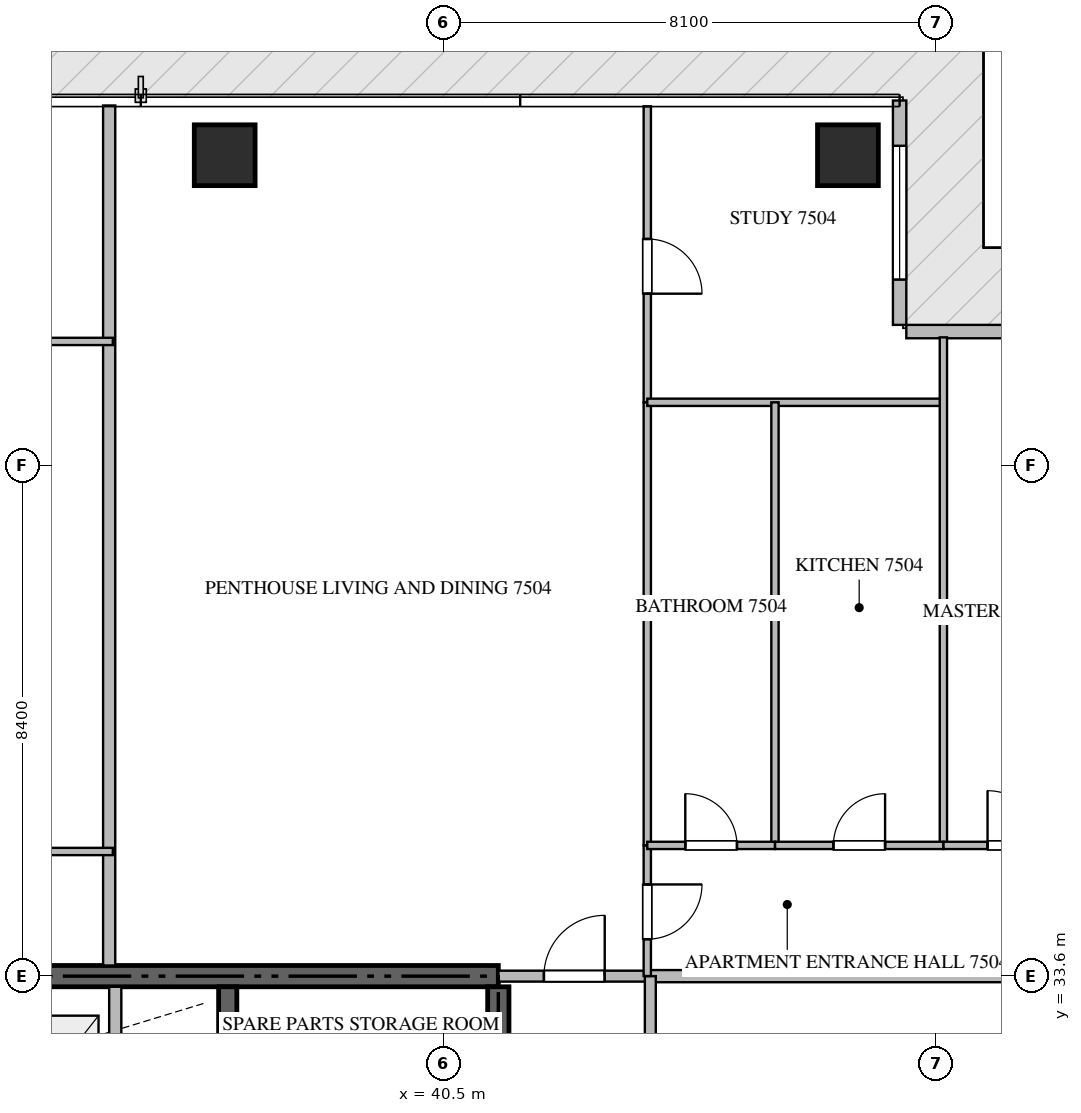
"""IFC4 building model, lengths in metres.
Left out: names, types, materials, properties, quantities, classifications, styles, units other than length and angle.
Written with IfcOpenShell. Run it as: python <this file> out.ifc"""

import sys

from ifc_helpers import new_model, si_unit, direction, frame, frame_2d, origin, origin_2d, place, context, subcontext, project, spatial, rectangle, extrude, source, transform, mapped, element, fill, save


model = new_model("IFC4")
c1 = context("Model", 3, precision=1e-05, world=origin(), true_north=direction((0.0, 1.0)))
c2 = subcontext(c1, "Body", "Model", "MODEL_VIEW")
j1 = project(units=[si_unit("LENGTHUNIT", "METRE"), si_unit("PLANEANGLEUNIT", "RADIAN")], contexts=[c1])
p1 = place(None, origin())
s1 = spatial("IfcSite", under=j1, at=p1, CompositionType="ELEMENT")
p2 = place(p1, origin())
s2 = spatial("IfcBuilding", under=s1, at=p2, CompositionType="ELEMENT")
p3 = place(p2, frame((0.0, 0.0, 301.55)))
s3 = spatial("IfcBuildingStorey", under=s2, at=p3, CompositionType="ELEMENT", Elevation=301.55)
p4 = place(p3, frame((41.4, 33.6, -0.26), z_axis=(0.0, 0.0, 1.0), x_axis=(-1.0, 0.0, 0.0)))
e1 = element("IfcWall", 1, at=p4, inside=s3, PredefinedType="SHEAR", context=c2, shape_type="SweptSolid", body=[
    extrude(rectangle(XDim=18.0, YDim=0.35, at=frame_2d((9.0, 0.0))), origin(), (0.0, 0.0, 1.0), 4.048),
])
p5 = place(p3, frame((41.4, 27.75, -0.26), z_axis=(0.0, 0.0, 1.0), x_axis=(0.0, 1.0, 0.0)))
e2 = element("IfcWall", 2, at=p5, inside=s3, PredefinedType="SHEAR", context=c2, shape_type="SweptSolid", body=[
    extrude(rectangle(XDim=5.675, YDim=0.35, at=frame_2d((2.837, 0.0))), origin(), (0.0, 0.0, 1.0), 4.048),
])
p6 = place(p3, frame((36.95, 27.05, -0.26), z_axis=(0.0, 0.0, 1.0), x_axis=(0.0, 1.0, 0.0)))
e3 = element("IfcWall", 3, at=p6, inside=s3, PredefinedType="SHEAR", context=c2, shape_type="SweptSolid", body=[
    extrude(rectangle(XDim=6.375, YDim=0.3, at=frame_2d((3.188, 0.0))), origin(), (0.0, 0.0, 1.0), 4.048),
])
m1 = source(origin(), c2, "Body", "SweptSolid", [
    extrude(rectangle(XDim=1.0, YDim=1.0, at=origin_2d()), origin(), (0.0, 0.0, 1.0), 4.05),
])
for number, where, z_axis, x_axis in (
    (4, (36.9, 47.1, -0.26), (0.0, 0.0, 1.0), (1.0, 0.0, 0.0)),
    (5, (47.15, 47.1, -0.26), (0.0, 0.0, 1.0), (1.0, 0.0, 0.0)),
):
    element("IfcColumn", number, at=place(p3, frame(where, z_axis=z_axis, x_axis=x_axis)), inside=s3, PredefinedType="COLUMN", context=c2, shape_type="MappedRepresentation", body=[
        mapped(m1, transform((0.0, 0.0, 0.0), scale=1.0)),
    ])
p7 = place(p3, frame((51.69, 44.2, 0.0), z_axis=(0.0, 0.0, 1.0), x_axis=(-1.0, 0.0, 0.0)))
e6 = element("IfcWall", 6, at=p7, inside=s3, PredefinedType="ELEMENTEDWALL", context=c2, shape_type="SweptSolid", body=[
    extrude(rectangle(XDim=3.58, YDim=0.22, at=frame_2d((1.79, 0.0))), origin(), (0.0, 0.0, 1.0), 3.775),
])
p8 = place(p3, frame((48.0, 44.31, 0.0), z_axis=(0.0, 0.0, 1.0), x_axis=(0.0, 1.0, 0.0)))
e7 = element("IfcWall", 7, at=p8, inside=s3, PredefinedType="ELEMENTEDWALL", context=c2, shape_type="SweptSolid", body=[
    extrude(rectangle(XDim=3.69, YDim=0.22, at=frame_2d((1.845, 0.0))), origin(), (0.0, 0.0, 1.0), 3.775),
])
p9 = place(p8, frame((0.745, 0.0, 0.65)))
e8 = element("IfcOpeningElement", 8, at=p9, cuts=e7, PredefinedType="OPENING", context=c2, shape_type="SweptSolid", body=[
    extrude(rectangle(XDim=2.2, YDim=2.4, at=frame_2d((1.1, 1.2))), frame((0.0, 0.12, 0.0), z_axis=(0.0, -1.0, 0.0), x_axis=(1.0, 0.0, 0.0)), (0.0, 0.0, 1.0), 0.24),
])
p10 = place(p3, frame((35.1, 30.75, 0.0), z_axis=(0.0, 0.0, 1.0), x_axis=(0.0, 1.0, 0.0)))
e9 = element("IfcWall", 9, at=p10, inside=s3, PredefinedType="STANDARD", context=c2, shape_type="SweptSolid", body=[
    extrude(rectangle(XDim=2.675, YDim=0.2, at=frame_2d((1.337, 0.0))), origin(), (0.0, 0.0, 1.0), 3.79),
])
p11 = place(p3, frame((35.0, 33.775, 0.0), z_axis=(0.0, 0.0, 1.0), x_axis=(0.0, 1.0, 0.0)))
e10 = element("IfcWall", 10, at=p11, inside=s3, PredefinedType="PARTITIONING", context=c2, shape_type="SweptSolid", body=[
    extrude(rectangle(XDim=14.143, YDim=0.2, at=frame_2d((7.072, 0.0))), origin(), (0.0, 0.0, 1.0), 3.79),
])
p12 = place(p3, frame((43.9, 33.6, 0.0), z_axis=(0.0, 0.0, 1.0), x_axis=(1.0, 0.0, 0.0)))
e11 = element("IfcWall", 11, at=p12, inside=s3, PredefinedType="PARTITIONING", context=c2, shape_type="SweptSolid", body=[
    extrude(rectangle(XDim=11.618, YDim=0.2, at=frame_2d((5.809, 0.0))), origin(), (0.0, 0.0, 1.0), 3.79),
])
p13 = place(p3, frame((41.402, 33.6, 0.0), z_axis=(0.0, 0.0, 1.0), x_axis=(1.0, 0.0, 0.0)))
e12 = element("IfcWall", 12, at=p13, inside=s3, PredefinedType="PARTITIONING", context=c2, shape_type="SweptSolid", body=[
    extrude(rectangle(XDim=2.496, YDim=0.18, at=frame_2d((1.248, 0.0))), origin(), (0.0, 0.0, 1.0), 3.79),
])
p14 = place(p13, frame((0.748, 0.0, 0.0)))
e13 = element("IfcOpeningElement", 13, at=p14, cuts=e12, PredefinedType="OPENING", context=c2, shape_type="SweptSolid", body=[
    extrude(rectangle(XDim=1.0, YDim=2.15, at=frame_2d((0.5, 1.075))), frame((0.0, 0.1, 0.0), z_axis=(0.0, -1.0, 0.0), x_axis=(1.0, 0.0, 0.0)), (0.0, 0.0, 1.0), 0.2),
])
p15 = place(p3, frame((43.9, 16.8, 0.0), z_axis=(0.0, 0.0, 1.0), x_axis=(0.0, 1.0, 0.0)))
e14 = element("IfcWall", 14, at=p15, inside=s3, PredefinedType="PARTITIONING", context=c2, shape_type="SweptSolid", body=[
    extrude(rectangle(XDim=16.8, YDim=0.18, at=frame_2d((8.4, 0.0))), origin(), (0.0, 0.0, 1.0), 3.79),
])
p16 = place(p15, frame((1.3, 0.0, 0.0)))
e15 = element("IfcOpeningElement", 15, at=p16, cuts=e14, PredefinedType="OPENING", context=c2, shape_type="SweptSolid", body=[
    extrude(rectangle(XDim=1.0, YDim=2.15, at=frame_2d((0.5, 1.075))), frame((0.0, 0.1, 0.0), z_axis=(0.0, -1.0, 0.0), x_axis=(1.0, 0.0, 0.0)), (0.0, 0.0, 1.0), 0.2),
])
for number, where, z_axis, x_axis in (
    (16, (26.3, 44.038, 0.0), (0.0, 0.0, 1.0), (1.0, 0.0, 0.0)),
    (17, (26.3, 35.65, 0.0), (0.0, 0.0, 1.0), (1.0, 0.0, 0.0)),
):
    element("IfcWall", number, at=place(p3, frame(where, z_axis=z_axis, x_axis=x_axis)), inside=s3, PredefinedType="PARTITIONING", context=c2, shape_type="SweptSolid", body=[
        extrude(rectangle(XDim=8.76, YDim=0.12, at=frame_2d((4.38, 0.0))), origin(), (0.0, 0.0, 1.0), 3.79),
    ])
p17 = place(p3, frame((43.85, 35.75, 0.0), z_axis=(0.0, 0.0, 1.0), x_axis=(0.0, -1.0, 0.0)))
e18 = element("IfcWall", 18, at=p17, inside=s3, PredefinedType="PARTITIONING", context=c2, shape_type="SweptSolid", body=[
    extrude(rectangle(XDim=2.148, YDim=0.12, at=frame_2d((1.074, 0.0))), origin(), (0.0, 0.0, 1.0), 3.79),
])
p18 = place(p17, frame((0.642, 0.0, 0.0)))
e19 = element("IfcOpeningElement", 19, at=p18, cuts=e18, PredefinedType="OPENING", context=c2, shape_type="SweptSolid", body=[
    extrude(rectangle(XDim=0.9, YDim=2.1, at=frame_2d((0.45, 1.05))), frame((0.0, 0.07, 0.0), z_axis=(0.0, -1.0, 0.0), x_axis=(1.0, 0.0, 0.0)), (0.0, 0.0, 1.0), 0.14),
])
p19 = place(p3, frame((43.85, 47.905, 0.0), z_axis=(0.0, 0.0, 1.0), x_axis=(0.0, -1.0, 0.0)))
e20 = element("IfcWall", 20, at=p19, inside=s3, PredefinedType="PARTITIONING", context=c2, shape_type="SweptSolid", body=[
    extrude(rectangle(XDim=4.868, YDim=0.12, at=frame_2d((2.434, 0.0))), origin(), (0.0, 0.0, 1.0), 3.79),
])
p20 = place(p19, frame((2.182, 0.0, 0.0)))
e21 = element("IfcOpeningElement", 21, at=p20, cuts=e20, PredefinedType="OPENING", context=c2, shape_type="SweptSolid", body=[
    extrude(rectangle(XDim=0.9, YDim=2.1, at=frame_2d((0.45, 1.05))), frame((0.0, 0.07, 0.0), z_axis=(0.0, -1.0, 0.0), x_axis=(1.0, 0.0, 0.0)), (0.0, 0.0, 1.0), 0.14),
])
p21 = place(p3, frame((43.85, 43.035, 0.0), z_axis=(0.0, 0.0, 1.0), x_axis=(0.0, -1.0, 0.0)))
e22 = element("IfcWall", 22, at=p21, inside=s3, PredefinedType="PARTITIONING", context=c2, shape_type="SweptSolid", body=[
    extrude(rectangle(XDim=7.283, YDim=0.12, at=frame_2d((3.642, 0.0))), origin(), (0.0, 0.0, 1.0), 3.79),
])
p22 = place(p3, frame((43.85, 43.037, 0.0), z_axis=(0.0, 0.0, 1.0), x_axis=(1.0, 0.0, 0.0)))
e23 = element("IfcWall", 23, at=p22, inside=s3, PredefinedType="PARTITIONING", context=c2, shape_type="SweptSolid", body=[
    extrude(rectangle(XDim=4.87, YDim=0.12, at=frame_2d((2.435, 0.0))), origin(), (0.0, 0.0, 1.0), 3.79),
])
p23 = place(p3, frame((48.72, 44.105, 0.0), z_axis=(0.0, 0.0, 1.0), x_axis=(0.0, -1.0, 0.0)))
e24 = element("IfcWall", 24, at=p23, inside=s3, PredefinedType="PARTITIONING", context=c2, shape_type="SweptSolid", body=[
    extrude(rectangle(XDim=8.355, YDim=0.12, at=frame_2d((4.177, 0.0))), origin(), (0.0, 0.0, 1.0), 3.79),
])
p24 = place(p3, frame((45.95, 43.037, 0.0), z_axis=(0.0, 0.0, 1.0), x_axis=(0.0, -1.0, 0.0)))
e25 = element("IfcWall", 25, at=p24, inside=s3, PredefinedType="PARTITIONING", context=c2, shape_type="SweptSolid", body=[
    extrude(rectangle(XDim=7.287, YDim=0.12, at=frame_2d((3.644, 0.0))), origin(), (0.0, 0.0, 1.0), 3.79),
])
p25 = place(p3, frame((43.85, 35.75, 0.0), z_axis=(0.0, 0.0, 1.0), x_axis=(1.0, 0.0, 0.0)))
e26 = element("IfcWall", 26, at=p25, inside=s3, PredefinedType="PARTITIONING", context=c2, shape_type="SweptSolid", body=[
    extrude(rectangle(XDim=2.1, YDim=0.12, at=frame_2d((1.05, 0.0))), origin(), (0.0, 0.0, 1.0), 3.79),
])
p26 = place(p25, frame((0.625, 0.0, 0.0)))
e27 = element("IfcOpeningElement", 27, at=p26, cuts=e26, PredefinedType="OPENING", context=c2, shape_type="SweptSolid", body=[
    extrude(rectangle(XDim=0.85, YDim=2.1, at=frame_2d((0.425, 1.05))), frame((0.0, 0.07, 0.0), z_axis=(0.0, -1.0, 0.0), x_axis=(1.0, 0.0, 0.0)), (0.0, 0.0, 1.0), 0.14),
])
p27 = place(p3, frame((45.952, 35.75, 0.0), z_axis=(0.0, 0.0, 1.0), x_axis=(1.0, 0.0, 0.0)))
e28 = element("IfcWall", 28, at=p27, inside=s3, PredefinedType="PARTITIONING", context=c2, shape_type="SweptSolid", body=[
    extrude(rectangle(XDim=2.768, YDim=0.12, at=frame_2d((1.384, 0.0))), origin(), (0.0, 0.0, 1.0), 3.79),
])
p28 = place(p27, frame((0.959, 0.0, 0.0)))
e29 = element("IfcOpeningElement", 29, at=p28, cuts=e28, PredefinedType="OPENING", context=c2, shape_type="SweptSolid", body=[
    extrude(rectangle(XDim=0.85, YDim=2.1, at=frame_2d((0.425, 1.05))), frame((0.0, 0.07, 0.0), z_axis=(0.0, -1.0, 0.0), x_axis=(1.0, 0.0, 0.0)), (0.0, 0.0, 1.0), 0.14),
])
p29 = place(p3, frame((48.722, 35.75, 0.0), z_axis=(0.0, 0.0, 1.0), x_axis=(1.0, 0.0, 0.0)))
e30 = element("IfcWall", 30, at=p29, inside=s3, PredefinedType="PARTITIONING", context=c2, shape_type="SweptSolid", body=[
    extrude(rectangle(XDim=2.348, YDim=0.12, at=frame_2d((1.174, 0.0))), origin(), (0.0, 0.0, 1.0), 3.79),
])
p30 = place(p29, frame((0.724, 0.0, 0.0)))
e31 = element("IfcOpeningElement", 31, at=p30, cuts=e30, PredefinedType="OPENING", context=c2, shape_type="SweptSolid", body=[
    extrude(rectangle(XDim=0.9, YDim=2.1, at=frame_2d((0.45, 1.05))), frame((0.0, 0.07, 0.0), z_axis=(0.0, -1.0, 0.0), x_axis=(1.0, 0.0, 0.0)), (0.0, 0.0, 1.0), 0.14),
])
m2 = source(origin(), c2, "Body", "SweptSolid", [
    extrude(rectangle(XDim=2.2, YDim=2.4, at=frame_2d((1.1, 1.2))), frame((0.0, 0.03, 0.0), z_axis=(0.0, -1.0, 0.0), x_axis=(1.0, 0.0, 0.0)), (0.0, 0.0, 1.0), 0.06),
])
p31 = place(p9, origin())
e32 = element("IfcWindow", 32, at=p31, inside=s3, PartitioningType="SINGLE_PANEL", PredefinedType="WINDOW", context=c2, shape_type="MappedRepresentation", body=[
    mapped(m2, transform((0.0, 0.0, 0.0), scale=1.0)),
])
fill(e8, e32)
m3 = source(origin(), c2, "Body", "SweptSolid", [
    extrude(rectangle(XDim=1.0, YDim=2.15, at=frame_2d((0.5, 1.075))), frame((0.0, 0.025, 0.0), z_axis=(0.0, -1.0, 0.0), x_axis=(1.0, 0.0, 0.0)), (0.0, 0.0, 1.0), 0.05),
])
p32 = place(p14, origin())
e33 = element("IfcDoor", 33, at=p32, inside=s3, OperationType="SINGLE_SWING_RIGHT", PredefinedType="DOOR", context=c2, shape_type="MappedRepresentation", body=[
    mapped(m3, transform((0.0, 0.0, 0.0), scale=1.0)),
])
fill(e13, e33)
m4 = source(origin(), c2, "Body", "SweptSolid", [
    extrude(rectangle(XDim=0.9, YDim=2.1, at=frame_2d((0.45, 1.05))), frame((0.0, 0.025, 0.0), z_axis=(0.0, -1.0, 0.0), x_axis=(1.0, 0.0, 0.0)), (0.0, 0.0, 1.0), 0.05),
])
p33 = place(p18, origin())
e34 = element("IfcDoor", 34, at=p33, inside=s3, OperationType="SINGLE_SWING_LEFT", PredefinedType="DOOR", context=c2, shape_type="MappedRepresentation", body=[
    mapped(m4, transform((0.0, 0.0, 0.0), scale=1.0)),
])
fill(e19, e34)
p34 = place(p20, origin())
e35 = element("IfcDoor", 35, at=p34, inside=s3, OperationType="SINGLE_SWING_RIGHT", PredefinedType="DOOR", context=c2, shape_type="MappedRepresentation", body=[
    mapped(m4, transform((0.0, 0.0, 0.0), scale=1.0)),
])
fill(e21, e35)
m5 = source(origin(), c2, "Body", "SweptSolid", [
    extrude(rectangle(XDim=0.85, YDim=2.1, at=frame_2d((0.425, 1.05))), frame((0.0, 0.025, 0.0), z_axis=(0.0, -1.0, 0.0), x_axis=(1.0, 0.0, 0.0)), (0.0, 0.0, 1.0), 0.05),
])
p35 = place(p26, origin())
e36 = element("IfcDoor", 36, at=p35, inside=s3, OperationType="SINGLE_SWING_LEFT", PredefinedType="DOOR", context=c2, shape_type="MappedRepresentation", body=[
    mapped(m5, transform((0.0, 0.0, 0.0), scale=1.0)),
])
fill(e27, e36)
p36 = place(p28, origin())
e37 = element("IfcDoor", 37, at=p36, inside=s3, OperationType="SINGLE_SWING_RIGHT", PredefinedType="DOOR", context=c2, shape_type="MappedRepresentation", body=[
    mapped(m5, transform((0.0, 0.0, 0.0), scale=1.0)),
])
fill(e29, e37)
p37 = place(p30, origin())
e38 = element("IfcDoor", 38, at=p37, inside=s3, OperationType="SINGLE_SWING_LEFT", PredefinedType="DOOR", context=c2, shape_type="MappedRepresentation", body=[
    mapped(m4, transform((0.0, 0.0, 0.0), scale=1.0)),
])
fill(e31, e38)
save(model, sys.argv[1])
